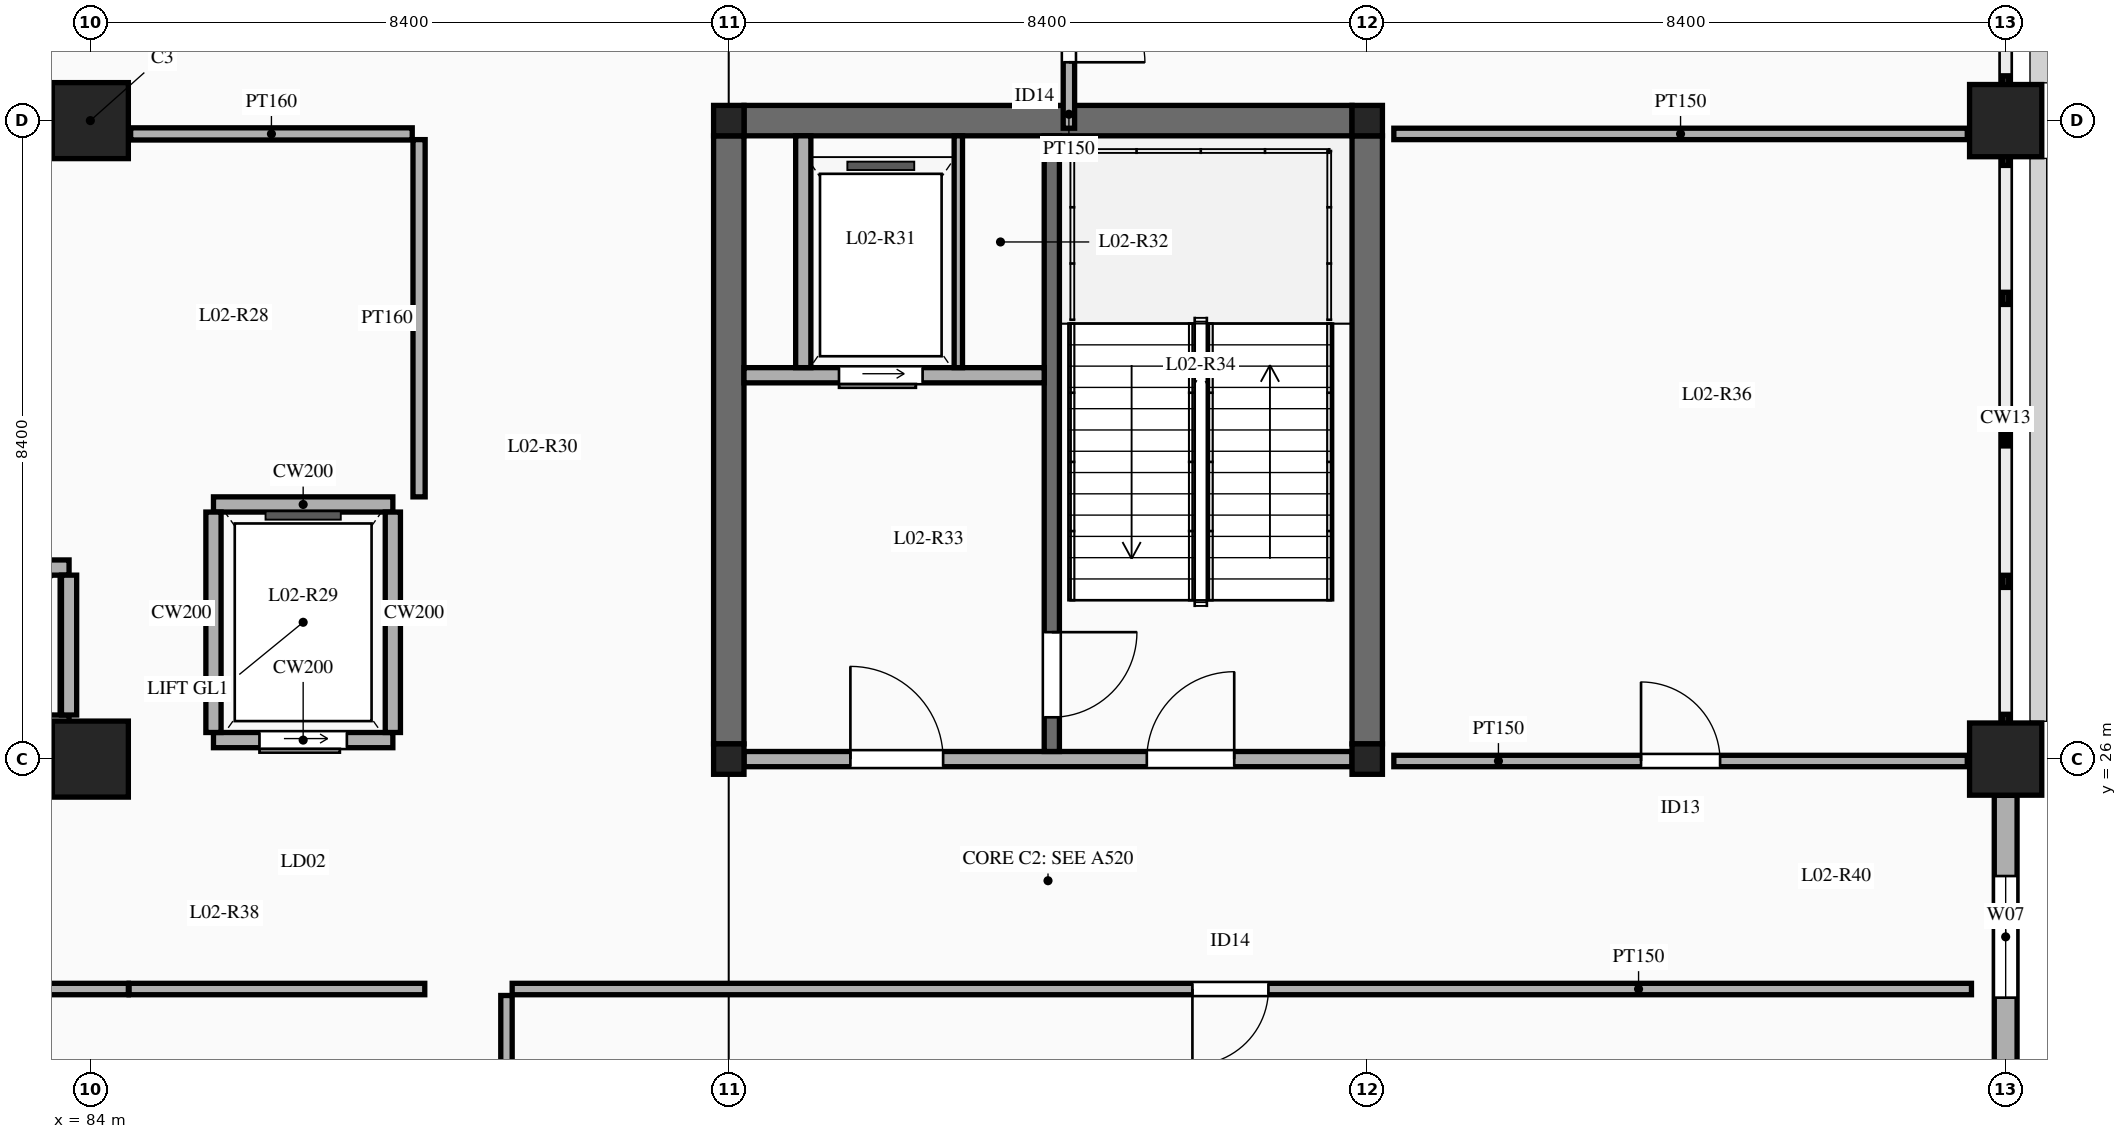
"""IFC4 building model, lengths in metres.
Left out: names, types, materials, properties, quantities, classifications, styles, units other than length and angle.
Written with IfcOpenShell. Run it as: python <this file> out.ifc"""

import sys

from ifc_helpers import new_model, si_unit, direction, frame, frame_2d, origin, origin_2d, place, context, subcontext, project, spatial, rectangle, extrude, element, fill, save


model = new_model("IFC4")
c1 = context("Model", 3, precision=1e-05, world=origin(), true_north=direction((0.0, 1.0)))
c2 = subcontext(c1, "Body", "Model", "MODEL_VIEW")
j1 = project(units=[si_unit("LENGTHUNIT", "METRE"), si_unit("PLANEANGLEUNIT", "RADIAN")], contexts=[c1])
p1 = place(None, origin())
s1 = spatial("IfcSite", under=j1, at=p1, CompositionType="ELEMENT")
p2 = place(p1, origin())
s2 = spatial("IfcBuilding", under=s1, at=p2, CompositionType="ELEMENT")
p3 = place(p2, frame((0.0, 0.0, 10.2)))
s3 = spatial("IfcBuildingStorey", under=s2, at=p3, CompositionType="ELEMENT", Elevation=10.2)
for number, where, z_axis, x_axis in (
    (1, (84.0, 26.0, 0.0), (0.0, 0.0, 1.0), (1.0, 0.0, 0.0)),
    (2, (84.0, 34.4, 0.0), (0.0, 0.0, 1.0), (1.0, 0.0, 0.0)),
):
    element("IfcColumn", number, at=place(p3, frame(where, z_axis=z_axis, x_axis=x_axis)), inside=s3, PredefinedType="COLUMN", context=c2, shape_type="SweptSolid", body=[
        extrude(rectangle(XDim=1.0, YDim=1.0, at=origin_2d()), origin(), (0.0, 0.0, 1.0), 4.8),
    ])
for number, where, z_axis, x_axis in (
    (3, (92.4, 26.0, 0.0), (0.0, 0.0, 1.0), (1.0, 0.0, 0.0)),
    (4, (92.4, 34.4, 0.0), (0.0, 0.0, 1.0), (1.0, 0.0, 0.0)),
    (5, (100.8, 26.0, 0.0), (0.0, 0.0, 1.0), (1.0, 0.0, 0.0)),
    (6, (100.8, 34.4, 0.0), (0.0, 0.0, 1.0), (1.0, 0.0, 0.0)),
):
    element("IfcColumn", number, at=place(p3, frame(where, z_axis=z_axis, x_axis=x_axis)), inside=s3, PredefinedType="COLUMN", context=c2, shape_type="SweptSolid", body=[
        extrude(rectangle(XDim=0.4, YDim=0.4, at=origin_2d()), origin(), (0.0, 0.0, 1.0), 4.8),
    ])
for number, where, z_axis, x_axis in (
    (7, (109.2, 26.0, 0.0), (0.0, 0.0, 1.0), (1.0, 0.0, 0.0)),
    (8, (109.2, 34.4, 0.0), (0.0, 0.0, 1.0), (1.0, 0.0, 0.0)),
):
    element("IfcColumn", number, at=place(p3, frame(where, z_axis=z_axis, x_axis=x_axis)), inside=s3, PredefinedType="COLUMN", context=c2, shape_type="SweptSolid", body=[
        extrude(rectangle(XDim=0.95, YDim=0.95, at=origin_2d()), origin(), (0.0, 0.0, 1.0), 4.8),
    ])
for number, where, z_axis, x_axis in (
    (9, (92.4, 26.2, 0.0), (0.0, 0.0, 1.0), (0.0, 1.0, 0.0)),
    (10, (100.8, 26.2, 0.0), (0.0, 0.0, 1.0), (0.0, 1.0, 0.0)),
    (11, (92.6, 34.4, 0.0), (0.0, 0.0, 1.0), (1.0, 0.0, 0.0)),
):
    element("IfcWall", number, at=place(p3, frame(where, z_axis=z_axis, x_axis=x_axis)), inside=s3, PredefinedType="SHEAR", context=c2, shape_type="SweptSolid", body=[
        extrude(rectangle(XDim=8.0, YDim=0.4, at=frame_2d((4.0, 0.0))), origin(), (0.0, 0.0, 1.0), 4.8),
    ])
p4 = place(p3, frame((109.2, 18.077, 0.0), z_axis=(0.0, 0.0, 1.0), x_axis=(0.0, 1.0, 0.0)))
e12 = element("IfcWall", 12, at=p4, inside=s3, PredefinedType="SOLIDWALL", context=c2, shape_type="SweptSolid", body=[
    extrude(rectangle(XDim=7.446, YDim=0.3, at=frame_2d((3.723, 0.0))), origin(), (0.0, 0.0, 1.0), 3.85),
])
p5 = place(p4, frame((1.062, 0.0, 0.9)))
e13 = element("IfcOpeningElement", 13, at=p5, cuts=e12, PredefinedType="OPENING", context=c2, shape_type="SweptSolid", body=[
    extrude(rectangle(XDim=1.6, YDim=2.1, at=frame_2d((0.8, 1.05))), frame((0.0, 0.16, 0.0), z_axis=(0.0, -1.0, 0.0), x_axis=(1.0, 0.0, 0.0)), (0.0, 0.0, 1.0), 0.32),
])
p6 = place(p4, frame((4.784, 0.0, 0.9)))
e14 = element("IfcOpeningElement", 14, at=p6, cuts=e12, PredefinedType="OPENING", context=c2, shape_type="SweptSolid", body=[
    extrude(rectangle(XDim=1.6, YDim=2.1, at=frame_2d((0.8, 1.05))), frame((0.0, 0.16, 0.0), z_axis=(0.0, -1.0, 0.0), x_axis=(1.0, 0.0, 0.0)), (0.0, 0.0, 1.0), 0.32),
])
p7 = place(p3, frame((92.6, 26.0, 0.0), z_axis=(0.0, 0.0, 1.0), x_axis=(1.0, 0.0, 0.0)))
e15 = element("IfcWall", 15, at=p7, inside=s3, PredefinedType="SOLIDWALL", context=c2, shape_type="SweptSolid", body=[
    extrude(rectangle(XDim=8.0, YDim=0.2, at=frame_2d((4.0, 0.0))), origin(), (0.0, 0.0, 1.0), 3.93),
])
p8 = place(p7, frame((1.4, 0.0, 0.0)))
e16 = element("IfcOpeningElement", 16, at=p8, cuts=e15, PredefinedType="OPENING", context=c2, shape_type="SweptSolid", body=[
    extrude(rectangle(XDim=1.22, YDim=2.15, at=frame_2d((0.61, 1.075))), frame((0.0, 0.11, 0.0), z_axis=(0.0, -1.0, 0.0), x_axis=(1.0, 0.0, 0.0)), (0.0, 0.0, 1.0), 0.22),
])
p9 = place(p7, frame((5.3, 0.0, 0.0)))
e17 = element("IfcOpeningElement", 17, at=p9, cuts=e15, PredefinedType="OPENING", context=c2, shape_type="SweptSolid", body=[
    extrude(rectangle(XDim=1.15, YDim=2.15, at=frame_2d((0.575, 1.075))), frame((0.0, 0.11, 0.0), z_axis=(0.0, -1.0, 0.0), x_axis=(1.0, 0.0, 0.0)), (0.0, 0.0, 1.0), 0.22),
])
p10 = place(p3, frame((96.65, 26.1, 0.0), z_axis=(0.0, 0.0, 1.0), x_axis=(0.0, 1.0, 0.0)))
e18 = element("IfcWall", 18, at=p10, inside=s3, PredefinedType="SOLIDWALL", context=c2, shape_type="SweptSolid", body=[
    extrude(rectangle(XDim=8.1, YDim=0.2, at=frame_2d((4.05, 0.0))), origin(), (0.0, 0.0, 1.0), 4.55),
])
p11 = place(p10, frame((0.45, 0.0, 0.0)))
e19 = element("IfcOpeningElement", 19, at=p11, cuts=e18, PredefinedType="OPENING", context=c2, shape_type="SweptSolid", body=[
    extrude(rectangle(XDim=1.12, YDim=2.15, at=frame_2d((0.56, 1.075))), frame((0.0, 0.11, 0.0), z_axis=(0.0, -1.0, 0.0), x_axis=(1.0, 0.0, 0.0)), (0.0, 0.0, 1.0), 0.22),
])
p12 = place(p3, frame((92.6, 31.05, 0.0), z_axis=(0.0, 0.0, 1.0), x_axis=(1.0, 0.0, 0.0)))
e20 = element("IfcWall", 20, at=p12, inside=s3, PredefinedType="SOLIDWALL", context=c2, shape_type="SweptSolid", body=[
    extrude(rectangle(XDim=3.95, YDim=0.2, at=frame_2d((1.975, 0.0))), origin(), (0.0, 0.0, 1.0), 4.55),
])
p13 = place(p12, frame((1.25, 0.0, 0.0)))
e21 = element("IfcOpeningElement", 21, at=p13, cuts=e20, PredefinedType="OPENING", context=c2, shape_type="SweptSolid", body=[
    extrude(rectangle(XDim=1.1, YDim=2.15, at=frame_2d((0.55, 1.075))), frame((0.0, 0.11, 0.0), z_axis=(0.0, -1.0, 0.0), x_axis=(1.0, 0.0, 0.0)), (0.0, 0.0, 1.0), 0.22),
])
p14 = place(p3, frame((95.42, 31.15, 0.0), z_axis=(0.0, 0.0, 1.0), x_axis=(0.0, 1.0, 0.0)))
e22 = element("IfcWall", 22, at=p14, inside=s3, PredefinedType="PARTITIONING", context=c2, shape_type="SweptSolid", body=[
    extrude(rectangle(XDim=3.05, YDim=0.11, at=frame_2d((1.525, 0.0))), origin(), (0.0, 0.0, 1.0), 4.55),
])
p15 = place(p3, frame((93.38, 31.15, 0.0), z_axis=(0.0, 0.0, 1.0), x_axis=(0.0, 1.0, 0.0)))
e23 = element("IfcWall", 23, at=p15, inside=s3, PredefinedType="SOLIDWALL", context=c2, shape_type="SweptSolid", body=[
    extrude(rectangle(XDim=3.05, YDim=0.2, at=frame_2d((1.525, 0.0))), origin(), (0.0, 0.0, 1.0), 4.55),
])
p16 = place(p3, frame((75.95, 26.48, 0.0), z_axis=(0.0, 0.0, 1.0), x_axis=(1.0, 0.0, 0.0)))
e24 = element("IfcWall", 24, at=p16, inside=s3, PredefinedType="SOLIDWALL", context=c2, shape_type="SweptSolid", body=[
    extrude(rectangle(XDim=7.77, YDim=0.2, at=frame_2d((3.885, 0.0))), origin(), (0.0, 0.0, 1.0), 4.55),
])
p17 = place(p16, frame((0.55, 0.0, 0.0)))
e25 = element("IfcOpeningElement", 25, at=p17, cuts=e24, PredefinedType="OPENING", context=c2, shape_type="SweptSolid", body=[
    extrude(rectangle(XDim=1.0, YDim=2.15, at=frame_2d((0.5, 1.075))), frame((0.0, 0.11, 0.0), z_axis=(0.0, -1.0, 0.0), x_axis=(1.0, 0.0, 0.0)), (0.0, 0.0, 1.0), 0.22),
])
p18 = place(p16, frame((3.35, 0.0, 0.0)))
e26 = element("IfcOpeningElement", 26, at=p18, cuts=e24, PredefinedType="OPENING", context=c2, shape_type="SweptSolid", body=[
    extrude(rectangle(XDim=1.0, YDim=2.15, at=frame_2d((0.5, 1.075))), frame((0.0, 0.11, 0.0), z_axis=(0.0, -1.0, 0.0), x_axis=(1.0, 0.0, 0.0)), (0.0, 0.0, 1.0), 0.22),
])
p19 = place(p16, frame((6.15, 0.0, 0.0)))
e27 = element("IfcOpeningElement", 27, at=p19, cuts=e24, PredefinedType="OPENING", context=c2, shape_type="SweptSolid", body=[
    extrude(rectangle(XDim=1.0, YDim=2.15, at=frame_2d((0.5, 1.075))), frame((0.0, 0.11, 0.0), z_axis=(0.0, -1.0, 0.0), x_axis=(1.0, 0.0, 0.0)), (0.0, 0.0, 1.0), 0.22),
])
p20 = place(p3, frame((75.95, 28.52, 0.0), z_axis=(0.0, 0.0, 1.0), x_axis=(1.0, 0.0, 0.0)))
e28 = element("IfcWall", 28, at=p20, inside=s3, PredefinedType="SOLIDWALL", context=c2, shape_type="SweptSolid", body=[
    extrude(rectangle(XDim=7.77, YDim=0.2, at=frame_2d((3.885, 0.0))), origin(), (0.0, 0.0, 1.0), 4.55),
])
p21 = place(p3, frame((83.72, 26.58, 0.0), z_axis=(0.0, 0.0, 1.0), x_axis=(0.0, 1.0, 0.0)))
e29 = element("IfcWall", 29, at=p21, inside=s3, PredefinedType="SOLIDWALL", context=c2, shape_type="SweptSolid", body=[
    extrude(rectangle(XDim=1.84, YDim=0.2, at=frame_2d((0.92, 0.0))), origin(), (0.0, 0.0, 1.0), 4.03),
])
p22 = place(p3, frame((85.62, 26.25, 0.0), z_axis=(0.0, 0.0, 1.0), x_axis=(1.0, 0.0, 0.0)))
e30 = element("IfcWall", 30, at=p22, inside=s3, PredefinedType="SOLIDWALL", context=c2, shape_type="SweptSolid", body=[
    extrude(rectangle(XDim=2.36, YDim=0.2, at=frame_2d((1.18, 0.0))), origin(), (0.0, 0.0, 1.0), 3.93),
])
p23 = place(p22, frame((0.605, 0.0, 0.0)))
e31 = element("IfcOpeningElement", 31, at=p23, cuts=e30, PredefinedType="OPENING", context=c2, shape_type="SweptSolid", body=[
    extrude(rectangle(XDim=1.15, YDim=2.2, at=frame_2d((0.575, 1.1))), frame((0.0, 0.11, 0.0), z_axis=(0.0, -1.0, 0.0), x_axis=(1.0, 0.0, 0.0)), (0.0, 0.0, 1.0), 0.22),
])
p24 = place(p3, frame((85.62, 29.35, 0.0), z_axis=(0.0, 0.0, 1.0), x_axis=(1.0, 0.0, 0.0)))
e32 = element("IfcWall", 32, at=p24, inside=s3, PredefinedType="SOLIDWALL", context=c2, shape_type="SweptSolid", body=[
    extrude(rectangle(XDim=2.36, YDim=0.2, at=frame_2d((1.18, 0.0))), origin(), (0.0, 0.0, 1.0), 4.55),
])
p25 = place(p3, frame((85.62, 26.35, 0.0), z_axis=(0.0, 0.0, 1.0), x_axis=(0.0, 1.0, 0.0)))
e33 = element("IfcWall", 33, at=p25, inside=s3, PredefinedType="SOLIDWALL", context=c2, shape_type="SweptSolid", body=[
    extrude(rectangle(XDim=2.9, YDim=0.2, at=frame_2d((1.45, 0.0))), origin(), (0.0, 0.0, 1.0), 4.55),
])
p26 = place(p3, frame((87.98, 26.35, 0.0), z_axis=(0.0, 0.0, 1.0), x_axis=(0.0, 1.0, 0.0)))
e34 = element("IfcWall", 34, at=p26, inside=s3, PredefinedType="SOLIDWALL", context=c2, shape_type="SweptSolid", body=[
    extrude(rectangle(XDim=2.9, YDim=0.2, at=frame_2d((1.45, 0.0))), origin(), (0.0, 0.0, 1.0), 4.23),
])
p27 = place(p3, frame((88.325, 29.45, 0.0), z_axis=(0.0, 0.0, 1.0), x_axis=(0.0, 1.0, 0.0)))
e35 = element("IfcWall", 35, at=p27, inside=s3, PredefinedType="PARTITIONING", context=c2, shape_type="SweptSolid", body=[
    extrude(rectangle(XDim=4.7, YDim=0.16, at=frame_2d((2.35, 0.0))), origin(), (0.0, 0.0, 1.0), 3.75),
])
p28 = place(p3, frame((84.53, 34.225, 0.0), z_axis=(0.0, 0.0, 1.0), x_axis=(1.0, 0.0, 0.0)))
e36 = element("IfcWall", 36, at=p28, inside=s3, PredefinedType="PARTITIONING", context=c2, shape_type="SweptSolid", body=[
    extrude(rectangle(XDim=3.705, YDim=0.16, at=frame_2d((1.853, 0.0))), origin(), (0.0, 0.0, 1.0), 3.75),
])
p29 = place(p3, frame((101.15, 25.975, 0.0), z_axis=(0.0, 0.0, 1.0), x_axis=(1.0, 0.0, 0.0)))
e37 = element("IfcWall", 37, at=p29, inside=s3, PredefinedType="PARTITIONING", context=c2, shape_type="SweptSolid", body=[
    extrude(rectangle(XDim=7.545, YDim=0.15, at=frame_2d((3.772, 0.0))), origin(), (0.0, 0.0, 1.0), 3.75),
])
p30 = place(p29, frame((3.252, 0.0, 0.0)))
e38 = element("IfcOpeningElement", 38, at=p30, cuts=e37, PredefinedType="OPENING", context=c2, shape_type="SweptSolid", body=[
    extrude(rectangle(XDim=1.04, YDim=2.15, at=frame_2d((0.52, 1.075))), frame((0.0, 0.085, 0.0), z_axis=(0.0, -1.0, 0.0), x_axis=(1.0, 0.0, 0.0)), (0.0, 0.0, 1.0), 0.17),
])
p31 = place(p3, frame((101.15, 34.225, 0.0), z_axis=(0.0, 0.0, 1.0), x_axis=(1.0, 0.0, 0.0)))
e39 = element("IfcWall", 39, at=p31, inside=s3, PredefinedType="PARTITIONING", context=c2, shape_type="SweptSolid", body=[
    extrude(rectangle(XDim=7.545, YDim=0.15, at=frame_2d((3.772, 0.0))), origin(), (0.0, 0.0, 1.0), 3.75),
])
p32 = place(p3, frame((76.05, 22.975, 0.0), z_axis=(0.0, 0.0, 1.0), x_axis=(1.0, 0.0, 0.0)))
e40 = element("IfcWall", 40, at=p32, inside=s3, PredefinedType="PARTITIONING", context=c2, shape_type="SweptSolid", body=[
    extrude(rectangle(XDim=8.45, YDim=0.15, at=frame_2d((4.225, 0.0))), origin(), (0.0, 0.0, 1.0), 3.75),
])
p33 = place(p32, frame((3.705, 0.0, 0.0)))
e41 = element("IfcOpeningElement", 41, at=p33, cuts=e40, PredefinedType="OPENING", context=c2, shape_type="SweptSolid", body=[
    extrude(rectangle(XDim=1.04, YDim=2.15, at=frame_2d((0.52, 1.075))), frame((0.0, 0.085, 0.0), z_axis=(0.0, -1.0, 0.0), x_axis=(1.0, 0.0, 0.0)), (0.0, 0.0, 1.0), 0.17),
])
p34 = place(p3, frame((84.51, 22.975, 0.0), z_axis=(0.0, 0.0, 1.0), x_axis=(1.0, 0.0, 0.0)))
e42 = element("IfcWall", 42, at=p34, inside=s3, PredefinedType="PARTITIONING", context=c2, shape_type="SweptSolid", body=[
    extrude(rectangle(XDim=3.89, YDim=0.15, at=frame_2d((1.945, 0.0))), origin(), (0.0, 0.0, 1.0), 3.75),
])
p35 = place(p3, frame((89.55, 22.975, 0.0), z_axis=(0.0, 0.0, 1.0), x_axis=(1.0, 0.0, 0.0)))
e43 = element("IfcWall", 43, at=p35, inside=s3, PredefinedType="PARTITIONING", context=c2, shape_type="SweptSolid", body=[
    extrude(rectangle(XDim=19.2, YDim=0.15, at=frame_2d((9.6, 0.0))), origin(), (0.0, 0.0, 1.0), 3.75),
])
p36 = place(p35, frame((8.95, 0.0, 0.0)))
e44 = element("IfcOpeningElement", 44, at=p36, cuts=e43, PredefinedType="OPENING", context=c2, shape_type="SweptSolid", body=[
    extrude(rectangle(XDim=1.0, YDim=2.15, at=frame_2d((0.5, 1.075))), frame((0.0, 0.085, 0.0), z_axis=(0.0, -1.0, 0.0), x_axis=(1.0, 0.0, 0.0)), (0.0, 0.0, 1.0), 0.17),
])
p37 = place(p3, frame((89.475, 9.65, 0.0), z_axis=(0.0, 0.0, 1.0), x_axis=(0.0, 1.0, 0.0)))
e45 = element("IfcWall", 45, at=p37, inside=s3, PredefinedType="PARTITIONING", context=c2, shape_type="SweptSolid", body=[
    extrude(rectangle(XDim=13.24, YDim=0.15, at=frame_2d((6.62, 0.0))), origin(), (0.0, 0.0, 1.0), 3.75),
])
p38 = place(p3, frame((96.875, 34.3, 0.0), z_axis=(0.0, 0.0, 1.0), x_axis=(0.0, 1.0, 0.0)))
e46 = element("IfcWall", 46, at=p38, inside=s3, PredefinedType="PARTITIONING", context=c2, shape_type="SweptSolid", body=[
    extrude(rectangle(XDim=2.735, YDim=0.15, at=frame_2d((1.367, 0.0))), origin(), (0.0, 0.0, 1.0), 3.75),
])
p39 = place(p38, frame((0.867, 0.0, 0.0)))
e47 = element("IfcOpeningElement", 47, at=p39, cuts=e46, PredefinedType="OPENING", context=c2, shape_type="SweptSolid", body=[
    extrude(rectangle(XDim=1.0, YDim=2.15, at=frame_2d((0.5, 1.075))), frame((0.0, 0.085, 0.0), z_axis=(0.0, -1.0, 0.0), x_axis=(1.0, 0.0, 0.0)), (0.0, 0.0, 1.0), 0.17),
])
p40 = place(p6, origin())
e48 = element("IfcWindow", 48, at=p40, inside=s3, PartitioningType="DOUBLE_PANEL_VERTICAL", PredefinedType="WINDOW", context=c2, shape_type="SweptSolid", body=[
    extrude(rectangle(XDim=1.6, YDim=2.1, at=frame_2d((0.8, 1.05))), frame((0.0, 0.03, 0.0), z_axis=(0.0, -1.0, 0.0), x_axis=(1.0, 0.0, 0.0)), (0.0, 0.0, 1.0), 0.06),
])
fill(e14, e48)
p41 = place(p8, origin())
e49 = element("IfcDoor", 49, at=p41, inside=s3, OperationType="SINGLE_SWING_LEFT", PredefinedType="DOOR", context=c2, shape_type="SweptSolid", body=[
    extrude(rectangle(XDim=1.22, YDim=2.15, at=frame_2d((0.61, 1.075))), frame((0.0, 0.025, 0.0), z_axis=(0.0, -1.0, 0.0), x_axis=(1.0, 0.0, 0.0)), (0.0, 0.0, 1.0), 0.05),
])
fill(e16, e49)
p42 = place(p9, origin())
e50 = element("IfcDoor", 50, at=p42, inside=s3, OperationType="SINGLE_SWING_RIGHT", PredefinedType="DOOR", context=c2, shape_type="SweptSolid", body=[
    extrude(rectangle(XDim=1.15, YDim=2.15, at=frame_2d((0.575, 1.075))), frame((0.0, 0.025, 0.0), z_axis=(0.0, -1.0, 0.0), x_axis=(1.0, 0.0, 0.0)), (0.0, 0.0, 1.0), 0.05),
])
fill(e17, e50)
p43 = place(p11, frame((1.12, 0.0, 0.0), z_axis=(0.0, 0.0, 1.0), x_axis=(-1.0, 0.0, 0.0)))
e51 = element("IfcDoor", 51, at=p43, inside=s3, OperationType="SINGLE_SWING_LEFT", PredefinedType="DOOR", context=c2, shape_type="SweptSolid", body=[
    extrude(rectangle(XDim=1.12, YDim=2.15, at=frame_2d((0.56, 1.075))), frame((0.0, 0.025, 0.0), z_axis=(0.0, -1.0, 0.0), x_axis=(1.0, 0.0, 0.0)), (0.0, 0.0, 1.0), 0.05),
])
fill(e19, e51)
p44 = place(p13, frame((1.1, 0.0, 0.0), z_axis=(0.0, 0.0, 1.0), x_axis=(-1.0, 0.0, 0.0)))
e52 = element("IfcDoor", 52, at=p44, inside=s3, OperationType="SLIDING_TO_LEFT", PredefinedType="DOOR", context=c2, shape_type="SweptSolid", body=[
    extrude(rectangle(XDim=1.1, YDim=2.15, at=frame_2d((0.55, 1.075))), frame((0.0, 0.025, 0.0), z_axis=(0.0, -1.0, 0.0), x_axis=(1.0, 0.0, 0.0)), (0.0, 0.0, 1.0), 0.05),
])
fill(e21, e52)
p45 = place(p23, frame((1.15, 0.0, 0.0), z_axis=(0.0, 0.0, 1.0), x_axis=(-1.0, 0.0, 0.0)))
e53 = element("IfcDoor", 53, at=p45, inside=s3, OperationType="SLIDING_TO_LEFT", PredefinedType="DOOR", context=c2, shape_type="SweptSolid", body=[
    extrude(rectangle(XDim=1.15, YDim=2.2, at=frame_2d((0.575, 1.1))), frame((0.0, 0.025, 0.0), z_axis=(0.0, -1.0, 0.0), x_axis=(1.0, 0.0, 0.0)), (0.0, 0.0, 1.0), 0.05),
])
fill(e31, e53)
p46 = place(p30, origin())
e54 = element("IfcDoor", 54, at=p46, inside=s3, OperationType="SINGLE_SWING_LEFT", PredefinedType="DOOR", context=c2, shape_type="SweptSolid", body=[
    extrude(rectangle(XDim=1.04, YDim=2.15, at=frame_2d((0.52, 1.075))), frame((0.0, 0.025, 0.0), z_axis=(0.0, -1.0, 0.0), x_axis=(1.0, 0.0, 0.0)), (0.0, 0.0, 1.0), 0.05),
])
fill(e38, e54)
p47 = place(p36, frame((1.0, 0.0, 0.0), z_axis=(0.0, 0.0, 1.0), x_axis=(-1.0, 0.0, 0.0)))
e55 = element("IfcDoor", 55, at=p47, inside=s3, OperationType="SINGLE_SWING_RIGHT", PredefinedType="DOOR", context=c2, shape_type="SweptSolid", body=[
    extrude(rectangle(XDim=1.0, YDim=2.15, at=frame_2d((0.5, 1.075))), frame((0.0, 0.025, 0.0), z_axis=(0.0, -1.0, 0.0), x_axis=(1.0, 0.0, 0.0)), (0.0, 0.0, 1.0), 0.05),
])
fill(e44, e55)
p48 = place(p39, frame((1.0, 0.0, 0.0), z_axis=(0.0, 0.0, 1.0), x_axis=(-1.0, 0.0, 0.0)))
e56 = element("IfcDoor", 56, at=p48, inside=s3, OperationType="SINGLE_SWING_RIGHT", PredefinedType="DOOR", context=c2, shape_type="SweptSolid", body=[
    extrude(rectangle(XDim=1.0, YDim=2.15, at=frame_2d((0.5, 1.075))), frame((0.0, 0.025, 0.0), z_axis=(0.0, -1.0, 0.0), x_axis=(1.0, 0.0, 0.0)), (0.0, 0.0, 1.0), 0.05),
])
fill(e47, e56)
save(model, sys.argv[1])
